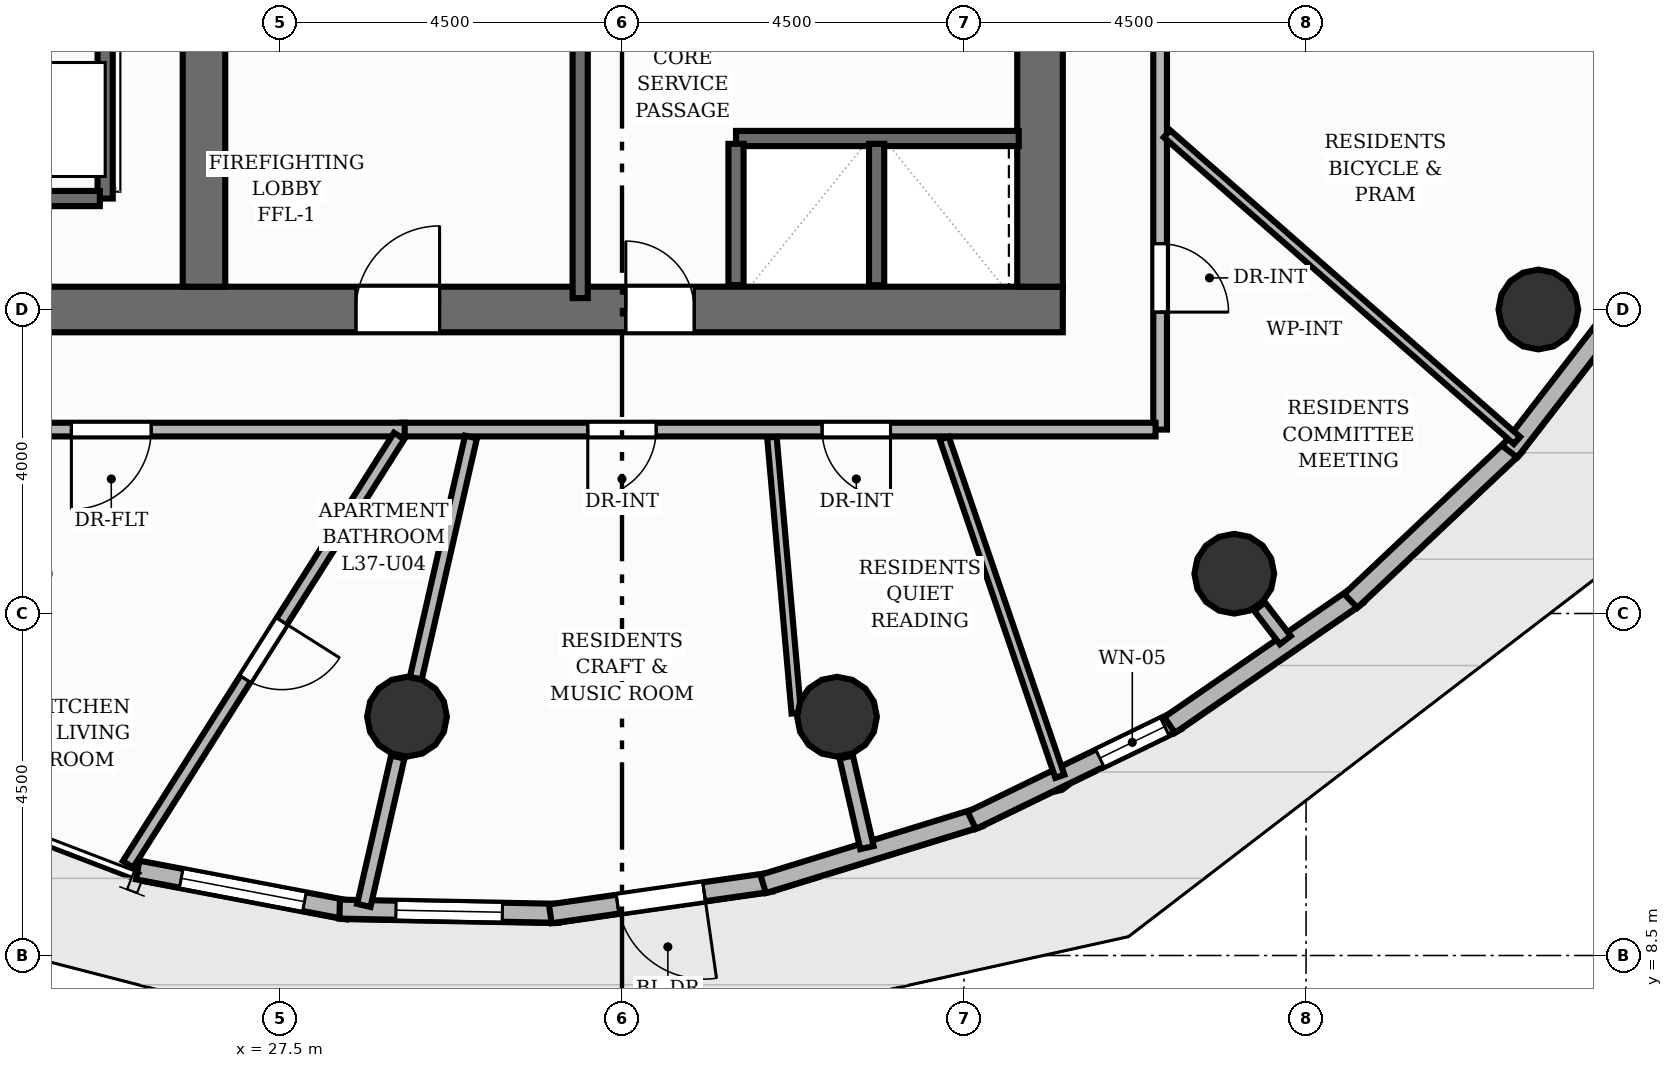
"""IFC4 building model, lengths in metres.
Left out: names, types, materials, properties, quantities, classifications, styles, units other than length and angle.
Written with IfcOpenShell. Run it as: python <this file> out.ifc"""

import sys

from ifc_helpers import new_model, si_unit, direction, frame, frame_2d, origin, origin_2d, place, context, subcontext, project, spatial, rectangle, circle, extrude, element, fill, save


model = new_model("IFC4")
c1 = context("Model", 3, precision=1e-05, world=origin(), true_north=direction((0.0, 1.0)))
c2 = subcontext(c1, "Body", "Model", "MODEL_VIEW")
j1 = project(units=[si_unit("LENGTHUNIT", "METRE"), si_unit("PLANEANGLEUNIT", "RADIAN")], contexts=[c1])
p1 = place(None, origin())
s1 = spatial("IfcSite", under=j1, at=p1, CompositionType="ELEMENT")
p2 = place(p1, origin())
s2 = spatial("IfcBuilding", under=s1, at=p2, CompositionType="ELEMENT")
p3 = place(p2, frame((0.0, 0.0, 126.56)))
s3 = spatial("IfcBuildingStorey", under=s2, at=p3, CompositionType="ELEMENT", Elevation=126.56)
p4 = place(p3, frame((22.7, 17.0, 0.0), z_axis=(0.0, 0.0, 1.0), x_axis=(1.0, 0.0, 0.0)))
e1 = element("IfcWall", 1, at=p4, inside=s3, PredefinedType="SHEAR", context=c2, shape_type="SweptSolid", body=[
    extrude(rectangle(XDim=15.1, YDim=0.6, at=frame_2d((7.55, 0.0))), origin(), (0.0, 0.0, 1.0), 3.2),
])
p5 = place(p4, frame((5.8, 0.0, 0.0)))
e2 = element("IfcOpeningElement", 2, at=p5, cuts=e1, PredefinedType="OPENING", context=c2, shape_type="SweptSolid", body=[
    extrude(rectangle(XDim=1.1, YDim=2.15, at=frame_2d((0.55, 1.075))), frame((0.0, 0.31, 0.0), z_axis=(0.0, -1.0, 0.0), x_axis=(1.0, 0.0, 0.0)), (0.0, 0.0, 1.0), 0.62),
])
p6 = place(p4, frame((9.35, 0.0, 0.0)))
e3 = element("IfcOpeningElement", 3, at=p6, cuts=e1, PredefinedType="OPENING", context=c2, shape_type="SweptSolid", body=[
    extrude(rectangle(XDim=0.9, YDim=2.1, at=frame_2d((0.45, 1.05))), frame((0.0, 0.31, 0.0), z_axis=(0.0, -1.0, 0.0), x_axis=(1.0, 0.0, 0.0)), (0.0, 0.0, 1.0), 0.62),
])
p7 = place(p3, frame((37.5, 17.3, 0.0), z_axis=(0.0, 0.0, 1.0), x_axis=(0.0, 1.0, 0.0)))
e4 = element("IfcWall", 4, at=p7, inside=s3, PredefinedType="SHEAR", context=c2, shape_type="SweptSolid", body=[
    extrude(rectangle(XDim=13.4, YDim=0.6, at=frame_2d((6.7, 0.0))), origin(), (0.0, 0.0, 1.0), 3.2),
])
p8 = place(p3, frame((26.5, 17.3, 0.0), z_axis=(0.0, 0.0, 1.0), x_axis=(0.0, 1.0, 0.0)))
e5 = element("IfcWall", 5, at=p8, inside=s3, PredefinedType="SHEAR", context=c2, shape_type="SweptSolid", body=[
    extrude(rectangle(XDim=13.4, YDim=0.56, at=frame_2d((6.7, 0.0))), origin(), (0.0, 0.0, 1.0), 3.2),
])
for number, where, z_axis, x_axis in (
    (6, (29.171, 11.642, 0.0), (0.0, 0.0, 1.0), (1.0, 0.0, 0.0)),
    (7, (34.829, 11.642, 0.0), (0.0, 0.0, 1.0), (1.0, 0.0, 0.0)),
    (8, (40.056, 13.523, 0.0), (0.0, 0.0, 1.0), (1.0, 0.0, 0.0)),
    (9, (44.056, 17.0, 0.0), (0.0, 0.0, 1.0), (1.0, 0.0, 0.0)),
):
    element("IfcColumn", number, at=place(p3, frame(where, z_axis=z_axis, x_axis=x_axis)), inside=s3, PredefinedType="COLUMN", context=c2, shape_type="SweptSolid", body=[
        extrude(circle(Radius=0.525, at=origin_2d()), origin(), (0.0, 0.0, 1.0), 3.2),
    ])
p9 = place(p3, frame((28.396, 9.099, 0.0), z_axis=(0.0, 0.0, 1.0), x_axis=(-0.982412055756, 0.18672587583, 0.0)))
e10 = element("IfcWall", 10, at=p9, inside=s3, PredefinedType="SOLIDWALL", context=c2, shape_type="SweptSolid", body=[
    extrude(rectangle(XDim=2.818, YDim=0.25, at=frame_2d((1.409, 0.0))), origin(), (0.0, 0.0, 1.0), 2.96),
])
p10 = place(p9, frame((0.584, 0.0, 0.85)))
e11 = element("IfcOpeningElement", 11, at=p10, cuts=e10, PredefinedType="OPENING", context=c2, shape_type="SweptSolid", body=[
    extrude(rectangle(XDim=1.65, YDim=1.55, at=frame_2d((0.825, 0.775))), frame((0.0, 0.135, 0.0), z_axis=(0.0, -1.0, 0.0), x_axis=(1.0, 0.0, 0.0)), (0.0, 0.0, 1.0), 0.27),
])
p11 = place(p3, frame((31.167, 9.055, 0.0), z_axis=(0.0, 0.0, 1.0), x_axis=(-0.99981990109, 0.018978023714, 0.0)))
e12 = element("IfcWall", 12, at=p11, inside=s3, PredefinedType="SOLIDWALL", context=c2, shape_type="SweptSolid", body=[
    extrude(rectangle(XDim=2.882, YDim=0.25, at=frame_2d((1.441, 0.0))), origin(), (0.0, 0.0, 1.0), 2.96),
])
p12 = place(p11, frame((0.741, 0.0, 0.85)))
e13 = element("IfcOpeningElement", 13, at=p12, cuts=e12, PredefinedType="OPENING", context=c2, shape_type="SweptSolid", body=[
    extrude(rectangle(XDim=1.4, YDim=1.55, at=frame_2d((0.7, 0.775))), frame((0.0, 0.135, 0.0), z_axis=(0.0, -1.0, 0.0), x_axis=(1.0, 0.0, 0.0)), (0.0, 0.0, 1.0), 0.27),
])
p13 = place(p3, frame((33.964, 9.466, 0.0), z_axis=(0.0, 0.0, 1.0), x_axis=(-0.989856170947, -0.142073082737, 0.0)))
e14 = element("IfcWall", 14, at=p13, inside=s3, PredefinedType="SOLIDWALL", context=c2, shape_type="SweptSolid", body=[
    extrude(rectangle(XDim=2.937, YDim=0.25, at=frame_2d((1.468, 0.0))), origin(), (0.0, 0.0, 1.0), 2.96),
])
p14 = place(p13, frame((0.893, 0.0, 0.0)))
e15 = element("IfcOpeningElement", 15, at=p14, cuts=e14, PredefinedType="OPENING", context=c2, shape_type="SweptSolid", body=[
    extrude(rectangle(XDim=1.15, YDim=2.2, at=frame_2d((0.575, 1.1))), frame((0.0, 0.135, 0.0), z_axis=(0.0, -1.0, 0.0), x_axis=(1.0, 0.0, 0.0)), (0.0, 0.0, 1.0), 0.27),
])
p15 = place(p3, frame((36.702, 10.319, 0.0), z_axis=(0.0, 0.0, 1.0), x_axis=(-0.955653025963, -0.294494981227, 0.0)))
e16 = element("IfcWall", 16, at=p15, inside=s3, PredefinedType="SOLIDWALL", context=c2, shape_type="SweptSolid", body=[
    extrude(rectangle(XDim=2.977, YDim=0.25, at=frame_2d((1.489, 0.0))), origin(), (0.0, 0.0, 1.0), 2.96),
])
p16 = place(p3, frame((39.299, 11.588, 0.0), z_axis=(0.0, 0.0, 1.0), x_axis=(-0.899657133161, -0.436597117206, 0.0)))
e17 = element("IfcWall", 17, at=p16, inside=s3, PredefinedType="SOLIDWALL", context=c2, shape_type="SweptSolid", body=[
    extrude(rectangle(XDim=2.998, YDim=0.25, at=frame_2d((1.499, 0.0))), origin(), (0.0, 0.0, 1.0), 2.96),
])
p17 = place(p16, frame((0.175, 0.0, 0.85)))
e18 = element("IfcOpeningElement", 18, at=p17, cuts=e17, PredefinedType="OPENING", context=c2, shape_type="SweptSolid", body=[
    extrude(rectangle(XDim=0.95, YDim=1.45, at=frame_2d((0.475, 0.725))), frame((0.0, 0.135, 0.0), z_axis=(0.0, -1.0, 0.0), x_axis=(1.0, 0.0, 0.0)), (0.0, 0.0, 1.0), 0.27),
])
p18 = place(p3, frame((41.673, 13.235, 0.0), z_axis=(0.0, 0.0, 1.0), x_axis=(-0.823228532994, -0.567710121863, 0.0)))
e19 = element("IfcWall", 19, at=p18, inside=s3, PredefinedType="SOLIDWALL", context=c2, shape_type="SweptSolid", body=[
    extrude(rectangle(XDim=2.998, YDim=0.25, at=frame_2d((1.499, 0.0))), origin(), (0.0, 0.0, 1.0), 2.96),
])
p19 = place(p3, frame((43.753, 15.211, 0.0), z_axis=(0.0, 0.0, 1.0), x_axis=(-0.727113217486, -0.686517566386, 0.0)))
e20 = element("IfcWall", 20, at=p19, inside=s3, PredefinedType="SOLIDWALL", context=c2, shape_type="SweptSolid", body=[
    extrude(rectangle(XDim=2.977, YDim=0.25, at=frame_2d((1.488, 0.0))), origin(), (0.0, 0.0, 1.0), 2.96),
])
p20 = place(p3, frame((45.475, 17.454, 0.0), z_axis=(0.0, 0.0, 1.0), x_axis=(-0.611416743811, -0.791308767415, 0.0)))
e21 = element("IfcWall", 21, at=p20, inside=s3, PredefinedType="SOLIDWALL", context=c2, shape_type="SweptSolid", body=[
    extrude(rectangle(XDim=2.937, YDim=0.25, at=frame_2d((1.468, 0.0))), origin(), (0.0, 0.0, 1.0), 2.96),
])
p21 = place(p3, frame((31.45, 17.15, 0.0), z_axis=(0.0, 0.0, 1.0), x_axis=(0.0, 1.0, 0.0)))
e22 = element("IfcWall", 22, at=p21, inside=s3, PredefinedType="SHEAR", context=c2, shape_type="SweptSolid", body=[
    extrude(rectangle(XDim=3.5, YDim=0.2, at=frame_2d((1.75, 0.0))), origin(), (0.0, 0.0, 1.0), 3.2),
])
p22 = place(p3, frame((25.2, 18.46, 0.0), z_axis=(0.0, 0.0, 1.0), x_axis=(0.0, 1.0, 0.0)))
e23 = element("IfcWall", 23, at=p22, inside=s3, PredefinedType="SHEAR", context=c2, shape_type="SweptSolid", body=[
    extrude(rectangle(XDim=11.08, YDim=0.2, at=frame_2d((5.54, 0.0))), origin(), (0.0, 0.0, 1.0), 3.2),
])
p23 = place(p3, frame((23.42, 18.46, 0.0), z_axis=(0.0, 0.0, 1.0), x_axis=(1.0, 0.0, 0.0)))
e24 = element("IfcWall", 24, at=p23, inside=s3, PredefinedType="SHEAR", context=c2, shape_type="SweptSolid", body=[
    extrude(rectangle(XDim=1.71, YDim=0.2, at=frame_2d((0.855, 0.0))), origin(), (0.0, 0.0, 1.0), 3.2),
])
p24 = place(p3, frame((33.5, 19.25, 0.0), z_axis=(0.0, 0.0, 1.0), x_axis=(1.0, 0.0, 0.0)))
e25 = element("IfcWall", 25, at=p24, inside=s3, PredefinedType="SHEAR", context=c2, shape_type="SweptSolid", body=[
    extrude(rectangle(XDim=3.72, YDim=0.2, at=frame_2d((1.86, 0.0))), origin(), (0.0, 0.0, 1.0), 3.2),
])
for number, where, z_axis, x_axis in (
    (26, (33.5, 17.32, 0.0), (0.0, 0.0, 1.0), (0.0, 1.0, 0.0)),
    (27, (35.35, 17.32, 0.0), (0.0, 0.0, 1.0), (0.0, 1.0, 0.0)),
):
    element("IfcWall", number, at=place(p3, frame(where, z_axis=z_axis, x_axis=x_axis)), inside=s3, PredefinedType="SHEAR", context=c2, shape_type="SweptSolid", body=[
        extrude(rectangle(XDim=1.86, YDim=0.2, at=frame_2d((0.93, 0.0))), origin(), (0.0, 0.0, 1.0), 3.2),
    ])
p25 = place(p3, frame((29.05, 11.111, 0.0), z_axis=(0.0, 0.0, 1.0), x_axis=(-0.2231492674, -0.974784286116, 0.0)))
e28 = element("IfcWall", 28, at=p25, inside=s3, PredefinedType="PARTITIONING", context=c2, shape_type="SweptSolid", body=[
    extrude(rectangle(XDim=2.002, YDim=0.18, at=frame_2d((1.001, 0.0))), origin(), (0.0, 0.0, 1.0), 2.336),
])
p26 = place(p3, frame((34.95, 11.111, 0.0), z_axis=(0.0, 0.0, 1.0), x_axis=(0.223107064029, -0.974793946422, 0.0)))
e29 = element("IfcWall", 29, at=p26, inside=s3, PredefinedType="PARTITIONING", context=c2, shape_type="SweptSolid", body=[
    extrude(rectangle(XDim=1.221, YDim=0.18, at=frame_2d((0.611, 0.0))), origin(), (0.0, 0.0, 1.0), 2.336),
])
p27 = place(p3, frame((40.388, 13.092, 0.0), z_axis=(0.0, 0.0, 1.0), x_axis=(0.609498830183, -0.792786967605, 0.0)))
e30 = element("IfcWall", 30, at=p27, inside=s3, PredefinedType="PARTITIONING", context=c2, shape_type="SweptSolid", body=[
    extrude(rectangle(XDim=0.557, YDim=0.18, at=frame_2d((0.278, 0.0))), origin(), (0.0, 0.0, 1.0), 2.336),
])
p28 = place(p3, frame((39.08, 23.848, 0.0), z_axis=(0.0, 0.0, 1.0), x_axis=(0.0, -1.0, 0.0)))
e31 = element("IfcWall", 31, at=p28, inside=s3, PredefinedType="PARTITIONING", context=c2, shape_type="SweptSolid", body=[
    extrude(rectangle(XDim=8.428, YDim=0.18, at=frame_2d((4.214, 0.0))), origin(), (0.0, 0.0, 1.0), 2.955),
])
p29 = place(p28, frame((2.327, 0.0, 0.0)))
e32 = element("IfcOpeningElement", 32, at=p29, cuts=e31, PredefinedType="OPENING", context=c2, shape_type="SweptSolid", body=[
    extrude(rectangle(XDim=0.9, YDim=2.1, at=frame_2d((0.45, 1.05))), frame((0.0, 0.1, 0.0), z_axis=(0.0, -1.0, 0.0), x_axis=(1.0, 0.0, 0.0)), (0.0, 0.0, 1.0), 0.2),
])
p30 = place(p28, frame((5.983, 0.0, 0.0)))
e33 = element("IfcOpeningElement", 33, at=p30, cuts=e31, PredefinedType="OPENING", context=c2, shape_type="SweptSolid", body=[
    extrude(rectangle(XDim=0.9, YDim=2.1, at=frame_2d((0.45, 1.05))), frame((0.0, 0.1, 0.0), z_axis=(0.0, -1.0, 0.0), x_axis=(1.0, 0.0, 0.0)), (0.0, 0.0, 1.0), 0.2),
])
p31 = place(p3, frame((39.02, 15.42, 0.0), z_axis=(0.0, 0.0, 1.0), x_axis=(-1.0, 0.0, 0.0)))
e34 = element("IfcWall", 34, at=p31, inside=s3, PredefinedType="PARTITIONING", context=c2, shape_type="SweptSolid", body=[
    extrude(rectangle(XDim=9.922, YDim=0.18, at=frame_2d((4.961, 0.0))), origin(), (0.0, 0.0, 1.0), 2.955),
])
p32 = place(p31, frame((3.487, 0.0, 0.0)))
e35 = element("IfcOpeningElement", 35, at=p32, cuts=e34, PredefinedType="OPENING", context=c2, shape_type="SweptSolid", body=[
    extrude(rectangle(XDim=0.9, YDim=2.1, at=frame_2d((0.45, 1.05))), frame((0.0, 0.1, 0.0), z_axis=(0.0, -1.0, 0.0), x_axis=(1.0, 0.0, 0.0)), (0.0, 0.0, 1.0), 0.2),
])
p33 = place(p31, frame((6.571, 0.0, 0.0)))
e36 = element("IfcOpeningElement", 36, at=p33, cuts=e34, PredefinedType="OPENING", context=c2, shape_type="SweptSolid", body=[
    extrude(rectangle(XDim=0.9, YDim=2.1, at=frame_2d((0.45, 1.05))), frame((0.0, 0.1, 0.0), z_axis=(0.0, -1.0, 0.0), x_axis=(1.0, 0.0, 0.0)), (0.0, 0.0, 1.0), 0.2),
])
p34 = place(p3, frame((29.141, 15.42, 0.0), z_axis=(0.0, 0.0, 1.0), x_axis=(-1.0, 0.0, 0.0)))
e37 = element("IfcWall", 37, at=p34, inside=s3, PredefinedType="PARTITIONING", context=c2, shape_type="SweptSolid", body=[
    extrude(rectangle(XDim=7.721, YDim=0.18, at=frame_2d((3.861, 0.0))), origin(), (0.0, 0.0, 1.0), 2.955),
])
p35 = place(p34, frame((3.336, 0.0, 0.0)))
e38 = element("IfcOpeningElement", 38, at=p35, cuts=e37, PredefinedType="OPENING", context=c2, shape_type="SweptSolid", body=[
    extrude(rectangle(XDim=1.05, YDim=2.15, at=frame_2d((0.525, 1.075))), frame((0.0, 0.1, 0.0), z_axis=(0.0, -1.0, 0.0), x_axis=(1.0, 0.0, 0.0)), (0.0, 0.0, 1.0), 0.2),
])
p36 = place(p3, frame((43.775, 15.277, 0.0), z_axis=(0.0, 0.0, 1.0), x_axis=(-0.752092313191, 0.659057776252, 0.0)))
e39 = element("IfcWall", 39, at=p36, inside=s3, PredefinedType="PARTITIONING", context=c2, shape_type="SweptSolid", body=[
    extrude(rectangle(XDim=6.122, YDim=0.125, at=frame_2d((3.061, 0.0))), origin(), (0.0, 0.0, 1.0), 2.955),
])
p37 = place(p3, frame((39.174, 22.723, 0.0), z_axis=(0.0, 0.0, 1.0), x_axis=(0.942245152982, -0.334923978959, 0.0)))
e40 = element("IfcWall", 40, at=p37, inside=s3, PredefinedType="PARTITIONING", context=c2, shape_type="SweptSolid", body=[
    extrude(rectangle(XDim=8.094, YDim=0.125, at=frame_2d((4.047, 0.0))), origin(), (0.0, 0.0, 1.0), 2.336),
])
p38 = place(p37, frame((3.597, 0.0, 0.0)))
e41 = element("IfcOpeningElement", 41, at=p38, cuts=e40, PredefinedType="OPENING", context=c2, shape_type="SweptSolid", body=[
    extrude(rectangle(XDim=0.9, YDim=2.1, at=frame_2d((0.45, 1.05))), frame((0.0, 0.073, 0.0), z_axis=(0.0, -1.0, 0.0), x_axis=(1.0, 0.0, 0.0)), (0.0, 0.0, 1.0), 0.145),
])
p39 = place(p3, frame((37.76, 10.858, 0.0), z_axis=(0.0, 0.0, 1.0), x_axis=(-0.323447862149, 0.946245993635, 0.0)))
e42 = element("IfcWall", 42, at=p39, inside=s3, PredefinedType="PARTITIONING", context=c2, shape_type="SweptSolid", body=[
    extrude(rectangle(XDim=4.701, YDim=0.125, at=frame_2d((2.351, 0.0))), origin(), (0.0, 0.0, 1.0), 2.955),
])
p40 = place(p3, frame((34.293, 11.689, 0.0), z_axis=(0.0, 0.0, 1.0), x_axis=(-0.088065804539, 0.996114659098, 0.0)))
e43 = element("IfcWall", 43, at=p40, inside=s3, PredefinedType="PARTITIONING", context=c2, shape_type="SweptSolid", body=[
    extrude(rectangle(XDim=3.646, YDim=0.125, at=frame_2d((1.823, 0.0))), origin(), (0.0, 0.0, 1.0), 2.336),
])
p41 = place(p3, frame((29.287, 12.149, 0.0), z_axis=(0.0, 0.0, 1.0), x_axis=(0.223166862669, 0.97478025801, 0.0)))
e44 = element("IfcWall", 44, at=p41, inside=s3, PredefinedType="PLUMBINGWALL", context=c2, shape_type="SweptSolid", body=[
    extrude(rectangle(XDim=3.256, YDim=0.16, at=frame_2d((1.628, 0.0))), origin(), (0.0, 0.0, 1.0), 2.336),
])
p42 = place(p3, frame((29.068, 15.335, 0.0), z_axis=(0.0, 0.0, 1.0), x_axis=(-0.534879638081, -0.844928264864, 0.0)))
e45 = element("IfcWall", 45, at=p42, inside=s3, PredefinedType="PLUMBINGWALL", context=c2, shape_type="SweptSolid", body=[
    extrude(rectangle(XDim=6.669, YDim=0.16, at=frame_2d((3.335, 0.0))), origin(), (0.0, 0.0, 1.0), 2.692),
])
p43 = place(p42, frame((2.885, 0.0, 0.0)))
e46 = element("IfcOpeningElement", 46, at=p43, cuts=e45, PredefinedType="OPENING", context=c2, shape_type="SweptSolid", body=[
    extrude(rectangle(XDim=0.9, YDim=2.1, at=frame_2d((0.45, 1.05))), frame((0.0, 0.09, 0.0), z_axis=(0.0, -1.0, 0.0), x_axis=(1.0, 0.0, 0.0)), (0.0, 0.0, 1.0), 0.18),
])
p44 = place(p14, origin())
e47 = element("IfcDoor", 47, at=p44, inside=s3, OperationType="SINGLE_SWING_LEFT", PredefinedType="DOOR", context=c2, shape_type="SweptSolid", body=[
    extrude(rectangle(XDim=1.15, YDim=2.2, at=frame_2d((0.575, 1.1))), frame((0.0, 0.025, 0.0), z_axis=(0.0, -1.0, 0.0), x_axis=(1.0, 0.0, 0.0)), (0.0, 0.0, 1.0), 0.05),
])
fill(e15, e47)
p45 = place(p10, origin())
e48 = element("IfcWindow", 48, at=p45, inside=s3, PartitioningType="SINGLE_PANEL", PredefinedType="WINDOW", context=c2, shape_type="SweptSolid", body=[
    extrude(rectangle(XDim=1.65, YDim=1.55, at=frame_2d((0.825, 0.775))), frame((0.0, 0.03, 0.0), z_axis=(0.0, -1.0, 0.0), x_axis=(1.0, 0.0, 0.0)), (0.0, 0.0, 1.0), 0.06),
])
fill(e11, e48)
p46 = place(p12, origin())
e49 = element("IfcWindow", 49, at=p46, inside=s3, PartitioningType="SINGLE_PANEL", PredefinedType="WINDOW", context=c2, shape_type="SweptSolid", body=[
    extrude(rectangle(XDim=1.4, YDim=1.55, at=frame_2d((0.7, 0.775))), frame((0.0, 0.03, 0.0), z_axis=(0.0, -1.0, 0.0), x_axis=(1.0, 0.0, 0.0)), (0.0, 0.0, 1.0), 0.06),
])
fill(e13, e49)
p47 = place(p17, origin())
e50 = element("IfcWindow", 50, at=p47, inside=s3, PartitioningType="SINGLE_PANEL", PredefinedType="WINDOW", context=c2, shape_type="SweptSolid", body=[
    extrude(rectangle(XDim=0.95, YDim=1.45, at=frame_2d((0.475, 0.725))), frame((0.0, 0.03, 0.0), z_axis=(0.0, -1.0, 0.0), x_axis=(1.0, 0.0, 0.0)), (0.0, 0.0, 1.0), 0.06),
])
fill(e18, e50)
p48 = place(p5, origin())
e51 = element("IfcDoor", 51, at=p48, inside=s3, OperationType="SINGLE_SWING_RIGHT", PredefinedType="DOOR", context=c2, shape_type="SweptSolid", body=[
    extrude(rectangle(XDim=1.1, YDim=2.15, at=frame_2d((0.55, 1.075))), frame((0.0, 0.025, 0.0), z_axis=(0.0, -1.0, 0.0), x_axis=(1.0, 0.0, 0.0)), (0.0, 0.0, 1.0), 0.05),
])
fill(e2, e51)
p49 = place(p6, origin())
e52 = element("IfcDoor", 52, at=p49, inside=s3, OperationType="SINGLE_SWING_LEFT", PredefinedType="DOOR", context=c2, shape_type="SweptSolid", body=[
    extrude(rectangle(XDim=0.9, YDim=2.1, at=frame_2d((0.45, 1.05))), frame((0.0, 0.025, 0.0), z_axis=(0.0, -1.0, 0.0), x_axis=(1.0, 0.0, 0.0)), (0.0, 0.0, 1.0), 0.05),
])
fill(e3, e52)
p50 = place(p30, origin())
e53 = element("IfcDoor", 53, at=p50, inside=s3, OperationType="SINGLE_SWING_RIGHT", PredefinedType="DOOR", context=c2, shape_type="SweptSolid", body=[
    extrude(rectangle(XDim=0.9, YDim=2.1, at=frame_2d((0.45, 1.05))), frame((0.0, 0.025, 0.0), z_axis=(0.0, -1.0, 0.0), x_axis=(1.0, 0.0, 0.0)), (0.0, 0.0, 1.0), 0.05),
])
fill(e33, e53)
p51 = place(p32, origin())
e54 = element("IfcDoor", 54, at=p51, inside=s3, OperationType="SINGLE_SWING_LEFT", PredefinedType="DOOR", context=c2, shape_type="SweptSolid", body=[
    extrude(rectangle(XDim=0.9, YDim=2.1, at=frame_2d((0.45, 1.05))), frame((0.0, 0.025, 0.0), z_axis=(0.0, -1.0, 0.0), x_axis=(1.0, 0.0, 0.0)), (0.0, 0.0, 1.0), 0.05),
])
fill(e35, e54)
p52 = place(p33, origin())
e55 = element("IfcDoor", 55, at=p52, inside=s3, OperationType="SINGLE_SWING_RIGHT", PredefinedType="DOOR", context=c2, shape_type="SweptSolid", body=[
    extrude(rectangle(XDim=0.9, YDim=2.1, at=frame_2d((0.45, 1.05))), frame((0.0, 0.025, 0.0), z_axis=(0.0, -1.0, 0.0), x_axis=(1.0, 0.0, 0.0)), (0.0, 0.0, 1.0), 0.05),
])
fill(e36, e55)
p53 = place(p35, origin())
e56 = element("IfcDoor", 56, at=p53, inside=s3, OperationType="SINGLE_SWING_RIGHT", PredefinedType="DOOR", context=c2, shape_type="SweptSolid", body=[
    extrude(rectangle(XDim=1.05, YDim=2.15, at=frame_2d((0.525, 1.075))), frame((0.0, 0.025, 0.0), z_axis=(0.0, -1.0, 0.0), x_axis=(1.0, 0.0, 0.0)), (0.0, 0.0, 1.0), 0.05),
])
fill(e38, e56)
p54 = place(p43, origin())
e57 = element("IfcDoor", 57, at=p54, inside=s3, OperationType="SINGLE_SWING_LEFT", PredefinedType="DOOR", context=c2, shape_type="SweptSolid", body=[
    extrude(rectangle(XDim=0.9, YDim=2.1, at=frame_2d((0.45, 1.05))), frame((0.0, 0.025, 0.0), z_axis=(0.0, -1.0, 0.0), x_axis=(1.0, 0.0, 0.0)), (0.0, 0.0, 1.0), 0.05),
])
fill(e46, e57)
save(model, sys.argv[1])
